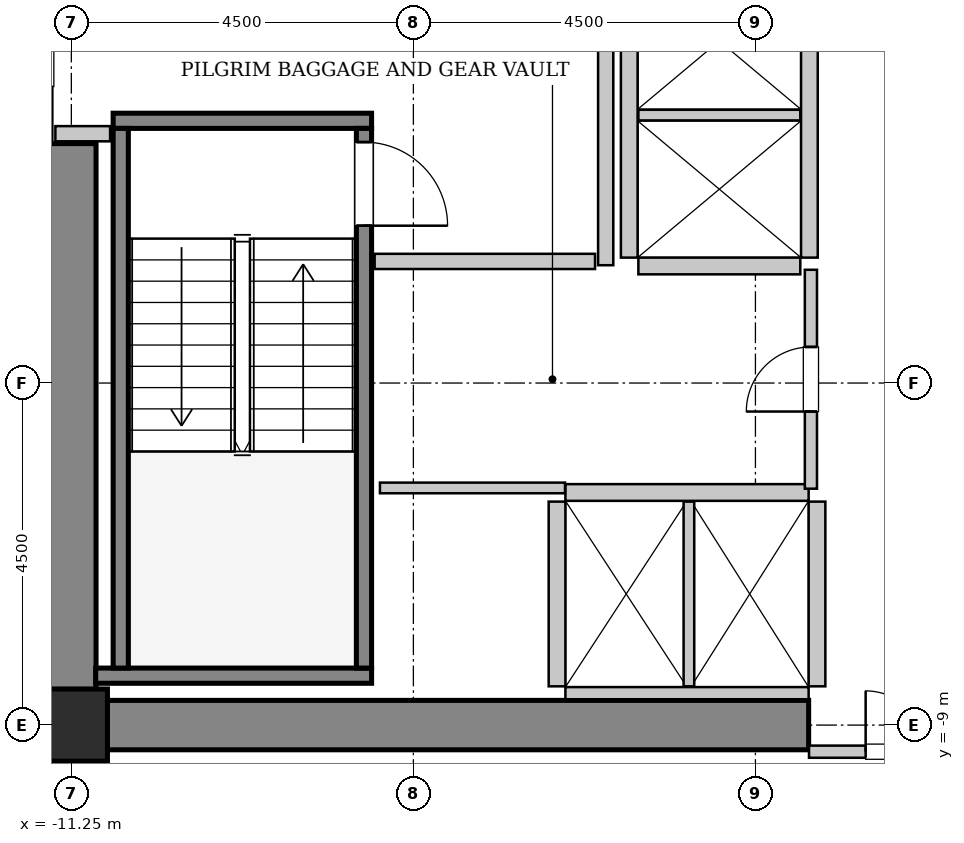
"""IFC4 building model, lengths in metres.
Left out: names, types, materials, properties, quantities, classifications, styles, units other than length and angle.
Written with IfcOpenShell. Run it as: python <this file> out.ifc"""

import sys

from ifc_helpers import new_model, si_unit, direction, frame, frame_2d, origin, origin_2d, place, context, subcontext, project, spatial, rectangle, hollow_rectangle, extrude, source, transform, mapped, element, fill, save


model = new_model("IFC4")
c1 = context("Model", 3, precision=1e-05, world=origin(), true_north=direction((0.0, 1.0)))
c2 = subcontext(c1, "Body", "Model", "MODEL_VIEW")
j1 = project(units=[si_unit("LENGTHUNIT", "METRE"), si_unit("PLANEANGLEUNIT", "RADIAN")], contexts=[c1])
p1 = place(None, origin())
s1 = spatial("IfcSite", under=j1, at=p1, CompositionType="ELEMENT")
p2 = place(p1, origin())
s2 = spatial("IfcBuilding", under=s1, at=p2, CompositionType="ELEMENT")
p3 = place(p2, frame((0.0, 0.0, 33.0)))
s3 = spatial("IfcBuildingStorey", under=s2, at=p3, CompositionType="ELEMENT", Elevation=33.0)
m1 = source(origin(), c2, "Body", "SweptSolid", [
    extrude(rectangle(XDim=10.025, YDim=0.65, at=frame_2d((5.012, 0.0))), origin(), (0.0, 0.0, 1.0), 3.8),
])
p4 = place(p3, frame((-11.575, -9.0, 0.0), z_axis=(0.0, 0.0, 1.0), x_axis=(1.0, 0.0, 0.0)))
e1 = element("IfcWall", 1, at=p4, inside=s3, PredefinedType="SHEAR", context=c2, shape_type="MappedRepresentation", body=[
    mapped(m1, transform((0.0, 0.0, 0.0), x_axis=(1.0, 0.0, 0.0), y_axis=(0.0, 1.0, 0.0), z_axis=(0.0, 0.0, 1.0), scale=1.0)),
])
m2 = source(origin(), c2, "Body", "SweptSolid", [
    extrude(rectangle(XDim=7.325, YDim=0.65, at=frame_2d((3.663, 0.0))), origin(), (0.0, 0.0, 1.0), 3.8),
])
p5 = place(p3, frame((-11.25, -8.675, 0.0), z_axis=(0.0, 0.0, 1.0), x_axis=(0.0, 1.0, 0.0)))
e2 = element("IfcWall", 2, at=p5, inside=s3, PredefinedType="SHEAR", context=c2, shape_type="MappedRepresentation", body=[
    mapped(m2, transform((0.0, 0.0, 0.0), x_axis=(1.0, 0.0, 0.0), y_axis=(0.0, 1.0, 0.0), z_axis=(0.0, 0.0, 1.0), scale=1.0)),
])
m3 = source(origin(), c2, "Body", "SweptSolid", [
    extrude(hollow_rectangle(XDim=0.95, YDim=0.95, WallThickness=0.045, InnerFilletRadius=0.045, OuterFilletRadius=0.09, at=origin_2d()), origin(), (0.0, 0.0, 1.0), 3.8),
])
p6 = place(p3, frame((-11.25, -9.0, 0.0), z_axis=(0.0, 0.0, 1.0), x_axis=(1.0, 0.0, 0.0)))
e3 = element("IfcColumn", 3, at=p6, inside=s3, PredefinedType="COLUMN", context=c2, shape_type="MappedRepresentation", body=[
    mapped(m3, transform((0.0, 0.0, 0.0), x_axis=(1.0, 0.0, 0.0), y_axis=(0.0, 1.0, 0.0), z_axis=(0.0, 0.0, 1.0), scale=1.0)),
])
m4 = source(origin(), c2, "Body", "SweptSolid", [
    extrude(rectangle(XDim=3.4, YDim=0.2, at=frame_2d((1.7, 0.0))), origin(), (0.0, 0.0, 1.0), 3.8),
])
p7 = place(p3, frame((-10.7, -1.05, 0.0), z_axis=(0.0, 0.0, 1.0), x_axis=(1.0, 0.0, 0.0)))
e4 = element("IfcWall", 4, at=p7, inside=s3, PredefinedType="SOLIDWALL", context=c2, shape_type="MappedRepresentation", body=[
    mapped(m4, transform((0.0, 0.0, 0.0), x_axis=(1.0, 0.0, 0.0), y_axis=(0.0, 1.0, 0.0), z_axis=(0.0, 0.0, 1.0), scale=1.0)),
])
m5 = source(origin(), c2, "Body", "SweptSolid", [
    extrude(rectangle(XDim=3.63, YDim=0.2, at=frame_2d((1.815, 0.0))), origin(), (0.0, 0.0, 1.0), 3.8),
])
p8 = place(p3, frame((-10.93, -8.35, 0.0), z_axis=(0.0, 0.0, 1.0), x_axis=(1.0, 0.0, 0.0)))
e5 = element("IfcWall", 5, at=p8, inside=s3, PredefinedType="SOLIDWALL", context=c2, shape_type="MappedRepresentation", body=[
    mapped(m5, transform((0.0, 0.0, 0.0), x_axis=(1.0, 0.0, 0.0), y_axis=(0.0, 1.0, 0.0), z_axis=(0.0, 0.0, 1.0), scale=1.0)),
])
m6 = source(origin(), c2, "Body", "SweptSolid", [
    extrude(rectangle(XDim=7.1, YDim=0.2, at=frame_2d((3.55, 0.0))), origin(), (0.0, 0.0, 1.0), 3.8),
])
p9 = place(p3, frame((-10.6, -1.15, 0.0), z_axis=(0.0, 0.0, 1.0), x_axis=(0.0, -1.0, 0.0)))
e6 = element("IfcWall", 6, at=p9, inside=s3, PredefinedType="SOLIDWALL", context=c2, shape_type="MappedRepresentation", body=[
    mapped(m6, transform((0.0, 0.0, 0.0), x_axis=(1.0, 0.0, 0.0), y_axis=(0.0, 1.0, 0.0), z_axis=(0.0, 0.0, 1.0), scale=1.0)),
])
p10 = place(p3, frame((-7.4, -1.15, 0.0), z_axis=(0.0, 0.0, 1.0), x_axis=(0.0, -1.0, 0.0)))
e7 = element("IfcWall", 7, at=p10, inside=s3, PredefinedType="SOLIDWALL", context=c2, shape_type="MappedRepresentation", body=[
    mapped(m6, transform((0.0, 0.0, 0.0), x_axis=(1.0, 0.0, 0.0), y_axis=(0.0, 1.0, 0.0), z_axis=(0.0, 0.0, 1.0), scale=1.0)),
])
p11 = place(p10, frame((0.18, 0.0, 0.0)))
e8 = element("IfcOpeningElement", 8, at=p11, cuts=e7, PredefinedType="OPENING", context=c2, shape_type="SweptSolid", body=[
    extrude(rectangle(XDim=1.1, YDim=2.15, at=frame_2d((0.55, 1.075))), frame((0.0, 0.11, 0.0), z_axis=(0.0, -1.0, 0.0), x_axis=(1.0, 0.0, 0.0)), (0.0, 0.0, 1.0), 0.22),
])
m7 = source(origin(), c2, "Body", "SweptSolid", [
    extrude(rectangle(XDim=3.2, YDim=0.22, at=frame_2d((1.6, 0.0))), origin(), (0.0, 0.0, 1.0), 3.535),
])
p12 = place(p3, frame((-1.55, -5.94, 0.0), z_axis=(0.0, 0.0, 1.0), x_axis=(-1.0, 0.0, 0.0)))
e9 = element("IfcWall", 9, at=p12, inside=s3, PredefinedType="SOLIDWALL", context=c2, shape_type="MappedRepresentation", body=[
    mapped(m7, transform((0.0, 0.0, 0.0), x_axis=(1.0, 0.0, 0.0), y_axis=(0.0, 1.0, 0.0), z_axis=(0.0, 0.0, 1.0), scale=1.0)),
])
m8 = source(origin(), c2, "Body", "SweptSolid", [
    extrude(rectangle(XDim=3.2, YDim=0.16, at=frame_2d((1.6, 0.0))), origin(), (0.0, 0.0, 1.0), 2.425),
])
p13 = place(p3, frame((-4.75, -8.58, 0.0), z_axis=(0.0, 0.0, 1.0), x_axis=(1.0, 0.0, 0.0)))
e10 = element("IfcWall", 10, at=p13, inside=s3, PredefinedType="PARTITIONING", context=c2, shape_type="MappedRepresentation", body=[
    mapped(m8, transform((0.0, 0.0, 0.0), x_axis=(1.0, 0.0, 0.0), y_axis=(0.0, 1.0, 0.0), z_axis=(0.0, 0.0, 1.0), scale=1.0)),
])
m9 = source(origin(), c2, "Body", "SweptSolid", [
    extrude(rectangle(XDim=2.43, YDim=0.22, at=frame_2d((1.215, 0.0))), origin(), (0.0, 0.0, 1.0), 3.535),
])
p14 = place(p3, frame((-4.86, -6.06, 0.0), z_axis=(0.0, 0.0, 1.0), x_axis=(0.0, -1.0, 0.0)))
e11 = element("IfcWall", 11, at=p14, inside=s3, PredefinedType="SOLIDWALL", context=c2, shape_type="MappedRepresentation", body=[
    mapped(m9, transform((0.0, 0.0, 0.0), x_axis=(1.0, 0.0, 0.0), y_axis=(0.0, 1.0, 0.0), z_axis=(0.0, 0.0, 1.0), scale=1.0)),
])
m10 = source(origin(), c2, "Body", "SweptSolid", [
    extrude(rectangle(XDim=2.43, YDim=0.14, at=frame_2d((1.215, 0.0))), origin(), (0.0, 0.0, 1.0), 3.535),
])
p15 = place(p3, frame((-3.125, -8.49, 0.0), z_axis=(0.0, 0.0, 1.0), x_axis=(0.0, 1.0, 0.0)))
e12 = element("IfcWall", 12, at=p15, inside=s3, PredefinedType="PARTITIONING", context=c2, shape_type="MappedRepresentation", body=[
    mapped(m10, transform((0.0, 0.0, 0.0), x_axis=(1.0, 0.0, 0.0), y_axis=(0.0, 1.0, 0.0), z_axis=(0.0, 0.0, 1.0), scale=1.0)),
])
p16 = place(p3, frame((-1.44, -8.49, 0.0), z_axis=(0.0, 0.0, 1.0), x_axis=(0.0, 1.0, 0.0)))
e13 = element("IfcWall", 13, at=p16, inside=s3, PredefinedType="SOLIDWALL", context=c2, shape_type="MappedRepresentation", body=[
    mapped(m9, transform((0.0, 0.0, 0.0), x_axis=(1.0, 0.0, 0.0), y_axis=(0.0, 1.0, 0.0), z_axis=(0.0, 0.0, 1.0), scale=1.0)),
])
m11 = source(origin(), c2, "Body", "SweptSolid", [
    extrude(rectangle(XDim=5.7, YDim=0.22, at=frame_2d((2.85, 0.0))), origin(), (0.0, 0.0, 1.0), 3.535),
])
for number, where, z_axis, x_axis in (
    (14, (-1.54, -2.85, 0.0), (0.0, 0.0, 1.0), (0.0, 1.0, 0.0)),
    (15, (-3.91, 2.85, 0.0), (0.0, 0.0, 1.0), (0.0, -1.0, 0.0)),
):
    element("IfcWall", number, at=place(p3, frame(where, z_axis=z_axis, x_axis=x_axis)), inside=s3, PredefinedType="SOLIDWALL", context=c2, shape_type="MappedRepresentation", body=[
        mapped(m11, transform((0.0, 0.0, 0.0), x_axis=(1.0, 0.0, 0.0), y_axis=(0.0, 1.0, 0.0), z_axis=(0.0, 0.0, 1.0), scale=1.0)),
    ])
m12 = source(origin(), c2, "Body", "SweptSolid", [
    extrude(rectangle(XDim=2.13, YDim=0.22, at=frame_2d((1.065, 0.0))), origin(), (0.0, 0.0, 1.0), 3.535),
])
p17 = place(p3, frame((-3.79, -2.96, 0.0), z_axis=(0.0, 0.0, 1.0), x_axis=(1.0, 0.0, 0.0)))
e16 = element("IfcWall", 16, at=p17, inside=s3, PredefinedType="SOLIDWALL", context=c2, shape_type="MappedRepresentation", body=[
    mapped(m12, transform((0.0, 0.0, 0.0), x_axis=(1.0, 0.0, 0.0), y_axis=(0.0, 1.0, 0.0), z_axis=(0.0, 0.0, 1.0), scale=1.0)),
])
m13 = source(origin(), c2, "Body", "SweptSolid", [
    extrude(rectangle(XDim=2.13, YDim=0.14, at=frame_2d((1.065, 0.0))), origin(), (0.0, 0.0, 1.0), 3.535),
])
p18 = place(p3, frame((-3.79, -0.975, 0.0), z_axis=(0.0, 0.0, 1.0), x_axis=(1.0, 0.0, 0.0)))
e17 = element("IfcWall", 17, at=p18, inside=s3, PredefinedType="PARTITIONING", context=c2, shape_type="MappedRepresentation", body=[
    mapped(m13, transform((0.0, 0.0, 0.0), x_axis=(1.0, 0.0, 0.0), y_axis=(0.0, 1.0, 0.0), z_axis=(0.0, 0.0, 1.0), scale=1.0)),
])
m14 = source(origin(), c2, "Body", "SweptSolid", [
    extrude(rectangle(XDim=5.9, YDim=0.2, at=frame_2d((2.95, 0.0))), origin(), (0.0, 0.0, 1.0), 3.535),
])
p19 = place(p3, frame((-4.22, -2.95, 0.0), z_axis=(0.0, 0.0, 1.0), x_axis=(0.0, 1.0, 0.0)))
e18 = element("IfcWall", 18, at=p19, inside=s3, PredefinedType="PARTITIONING", context=c2, shape_type="MappedRepresentation", body=[
    mapped(m14, transform((0.0, 0.0, 0.0), x_axis=(1.0, 0.0, 0.0), y_axis=(0.0, 1.0, 0.0), z_axis=(0.0, 0.0, 1.0), scale=1.0)),
])
m15 = source(origin(), c2, "Body", "SweptSolid", [
    extrude(rectangle(XDim=2.9, YDim=0.2, at=frame_2d((1.45, 0.0))), origin(), (0.0, 0.0, 1.0), 3.535),
])
p20 = place(p3, frame((-7.26, -2.9, 0.0), z_axis=(0.0, 0.0, 1.0), x_axis=(1.0, 0.0, 0.0)))
e19 = element("IfcWall", 19, at=p20, inside=s3, PredefinedType="PARTITIONING", context=c2, shape_type="MappedRepresentation", body=[
    mapped(m15, transform((0.0, 0.0, 0.0), x_axis=(1.0, 0.0, 0.0), y_axis=(0.0, 1.0, 0.0), z_axis=(0.0, 0.0, 1.0), scale=1.0)),
])
m16 = source(origin(), c2, "Body", "SweptSolid", [
    extrude(rectangle(XDim=0.72, YDim=0.2, at=frame_2d((0.36, 0.0))), origin(), (0.0, 0.0, 1.0), 3.535),
])
p21 = place(p3, frame((-11.46, -1.22, 0.0), z_axis=(0.0, 0.0, 1.0), x_axis=(1.0, 0.0, 0.0)))
e20 = element("IfcWall", 20, at=p21, inside=s3, PredefinedType="PARTITIONING", context=c2, shape_type="MappedRepresentation", body=[
    mapped(m16, transform((0.0, 0.0, 0.0), x_axis=(1.0, 0.0, 0.0), y_axis=(0.0, 1.0, 0.0), z_axis=(0.0, 0.0, 1.0), scale=1.0)),
])
m17 = source(origin(), c2, "Body", "SweptSolid", [
    extrude(rectangle(XDim=3.09, YDim=0.16, at=frame_2d((1.545, 0.0))), origin(), (0.0, 0.0, 1.0), 2.425),
])
p22 = place(p3, frame((-1.545, -9.35, 0.0), z_axis=(0.0, 0.0, 1.0), x_axis=(1.0, 0.0, 0.0)))
e21 = element("IfcWall", 21, at=p22, inside=s3, PredefinedType="PARTITIONING", context=c2, shape_type="MappedRepresentation", body=[
    mapped(m17, transform((0.0, 0.0, 0.0), x_axis=(1.0, 0.0, 0.0), y_axis=(0.0, 1.0, 0.0), z_axis=(0.0, 0.0, 1.0), scale=1.0)),
])
p23 = place(p22, frame((0.745, 0.0, 0.0)))
e22 = element("IfcOpeningElement", 22, at=p23, cuts=e21, PredefinedType="OPENING", context=c2, shape_type="SweptSolid", body=[
    extrude(rectangle(XDim=1.6, YDim=2.3, at=frame_2d((0.8, 1.15))), frame((0.0, 0.09, 0.0), z_axis=(0.0, -1.0, 0.0), x_axis=(1.0, 0.0, 0.0)), (0.0, 0.0, 1.0), 0.18),
])
m18 = source(origin(), c2, "Body", "SweptSolid", [
    extrude(rectangle(XDim=2.88, YDim=0.16, at=frame_2d((1.44, 0.0))), origin(), (0.0, 0.0, 1.0), 3.535),
])
p24 = place(p3, frame((-1.52, -5.89, 0.0), z_axis=(0.0, 0.0, 1.0), x_axis=(0.0, 1.0, 0.0)))
e23 = element("IfcWall", 23, at=p24, inside=s3, PredefinedType="PARTITIONING", context=c2, shape_type="MappedRepresentation", body=[
    mapped(m18, transform((0.0, 0.0, 0.0), x_axis=(1.0, 0.0, 0.0), y_axis=(0.0, 1.0, 0.0), z_axis=(0.0, 0.0, 1.0), scale=1.0)),
])
p25 = place(p24, frame((1.015, 0.0, 0.0)))
e24 = element("IfcOpeningElement", 24, at=p25, cuts=e23, PredefinedType="OPENING", context=c2, shape_type="SweptSolid", body=[
    extrude(rectangle(XDim=0.85, YDim=2.1, at=frame_2d((0.425, 1.05))), frame((0.0, 0.09, 0.0), z_axis=(0.0, -1.0, 0.0), x_axis=(1.0, 0.0, 0.0)), (0.0, 0.0, 1.0), 0.18),
])
m19 = source(origin(), c2, "Body", "SweptSolid", [
    extrude(rectangle(XDim=2.435, YDim=0.14, at=frame_2d((1.218, 0.0))), origin(), (0.0, 0.0, 1.0), 3.535),
])
p26 = place(p3, frame((-7.19, -5.88, 0.0), z_axis=(0.0, 0.0, 1.0), x_axis=(1.0, 0.0, 0.0)))
e25 = element("IfcWall", 25, at=p26, inside=s3, PredefinedType="PARTITIONING", context=c2, shape_type="MappedRepresentation", body=[
    mapped(m19, transform((0.0, 0.0, 0.0), x_axis=(1.0, 0.0, 0.0), y_axis=(0.0, 1.0, 0.0), z_axis=(0.0, 0.0, 1.0), scale=1.0)),
])
m20 = source(origin(), c2, "Body", "SweptSolid", [
    extrude(rectangle(XDim=1.1, YDim=2.15, at=frame_2d((0.55, 1.075))), frame((0.0, 0.025, 0.0), z_axis=(0.0, -1.0, 0.0), x_axis=(1.0, 0.0, 0.0)), (0.0, 0.0, 1.0), 0.05),
])
p27 = place(p11, origin())
e26 = element("IfcDoor", 26, at=p27, inside=s3, OperationType="SINGLE_SWING_RIGHT", PredefinedType="DOOR", context=c2, shape_type="MappedRepresentation", body=[
    mapped(m20, transform((0.0, 0.0, 0.0), x_axis=(1.0, 0.0, 0.0), y_axis=(0.0, 1.0, 0.0), z_axis=(0.0, 0.0, 1.0), scale=1.0)),
])
fill(e8, e26)
m21 = source(origin(), c2, "Body", "SweptSolid", [
    extrude(rectangle(XDim=1.6, YDim=2.3, at=frame_2d((0.8, 1.15))), frame((0.0, 0.025, 0.0), z_axis=(0.0, -1.0, 0.0), x_axis=(1.0, 0.0, 0.0)), (0.0, 0.0, 1.0), 0.05),
])
p28 = place(p23, origin())
e27 = element("IfcDoor", 27, at=p28, inside=s3, OperationType="DOUBLE_DOOR_SINGLE_SWING", PredefinedType="DOOR", context=c2, shape_type="MappedRepresentation", body=[
    mapped(m21, transform((0.0, 0.0, 0.0), x_axis=(1.0, 0.0, 0.0), y_axis=(0.0, 1.0, 0.0), z_axis=(0.0, 0.0, 1.0), scale=1.0)),
])
fill(e22, e27)
m22 = source(origin(), c2, "Body", "SweptSolid", [
    extrude(rectangle(XDim=0.85, YDim=2.1, at=frame_2d((0.425, 1.05))), frame((0.0, 0.025, 0.0), z_axis=(0.0, -1.0, 0.0), x_axis=(1.0, 0.0, 0.0)), (0.0, 0.0, 1.0), 0.05),
])
p29 = place(p25, origin())
e28 = element("IfcDoor", 28, at=p29, inside=s3, OperationType="SINGLE_SWING_LEFT", PredefinedType="DOOR", context=c2, shape_type="MappedRepresentation", body=[
    mapped(m22, transform((0.0, 0.0, 0.0), x_axis=(1.0, 0.0, 0.0), y_axis=(0.0, 1.0, 0.0), z_axis=(0.0, 0.0, 1.0), scale=1.0)),
])
fill(e24, e28)
save(model, sys.argv[1])
